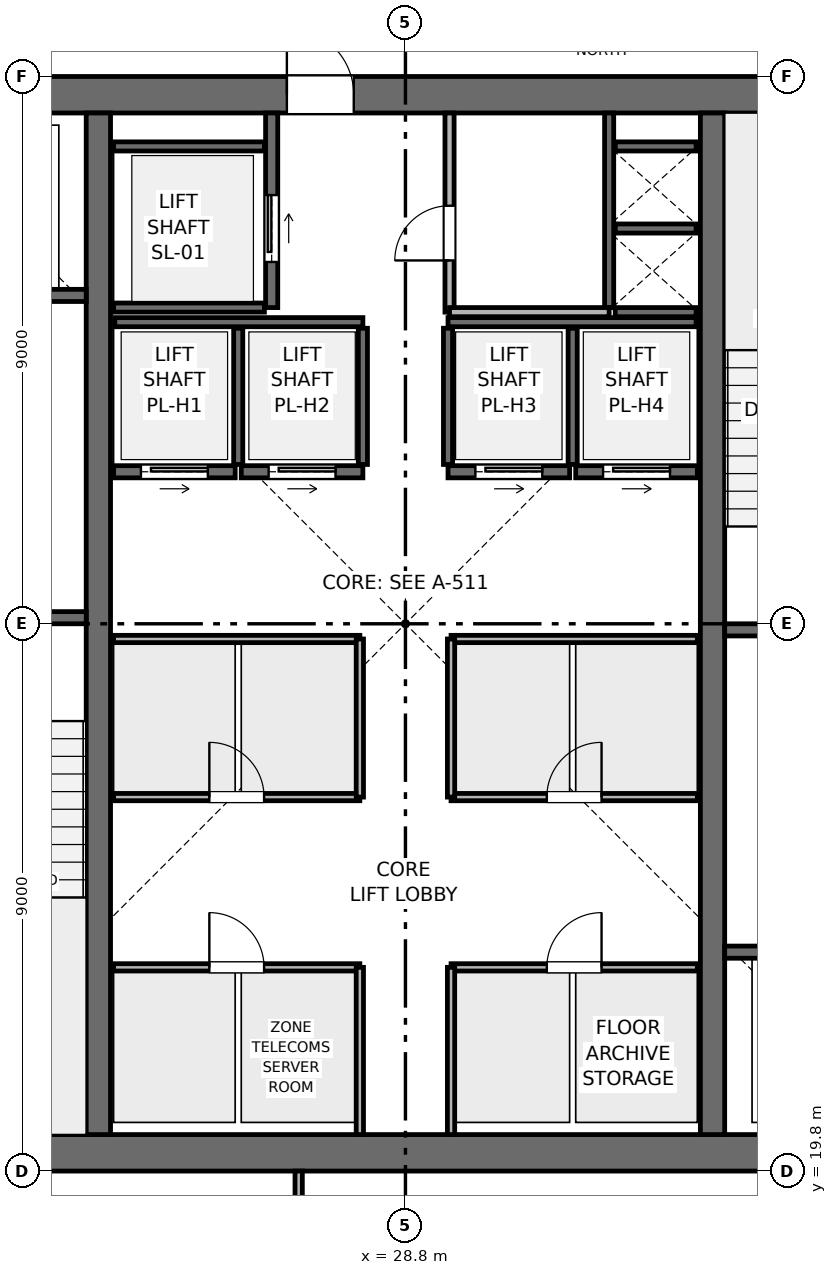
"""IFC4 building model, lengths in metres.
Left out: names, types, materials, properties, quantities, classifications, styles, units other than length and angle.
Written with IfcOpenShell. Run it as: python <this file> out.ifc"""

import sys

from ifc_helpers import new_model, si_unit, direction, frame, frame_2d, origin, place, context, subcontext, project, spatial, rectangle, extrude, element, fill, save


model = new_model("IFC4")
c1 = context("Model", 3, precision=1e-05, world=origin(), true_north=direction((0.0, 1.0)))
c2 = subcontext(c1, "Body", "Model", "MODEL_VIEW")
j1 = project(units=[si_unit("LENGTHUNIT", "METRE"), si_unit("PLANEANGLEUNIT", "RADIAN")], contexts=[c1])
p1 = place(None, origin())
s1 = spatial("IfcSite", under=j1, at=p1, CompositionType="ELEMENT")
p2 = place(p1, origin())
s2 = spatial("IfcBuilding", under=s1, at=p2, CompositionType="ELEMENT")
p3 = place(p2, frame((0.0, 0.0, 333.0)))
s3 = spatial("IfcBuildingStorey", under=s2, at=p3, CompositionType="ELEMENT", Elevation=333.0)
p4 = place(p3, frame((19.8, 20.1, 0.0), z_axis=(0.0, 0.0, 1.0), x_axis=(1.0, 0.0, 0.0)))
e1 = element("IfcWall", 1, at=p4, inside=s3, PredefinedType="SHEAR", context=c2, shape_type="SweptSolid", body=[
    extrude(rectangle(XDim=18.0, YDim=0.6, at=frame_2d((9.0, 0.0))), origin(), (0.0, 0.0, 1.0), 3.75),
])
p5 = place(p3, frame((19.8, 37.5, 0.0), z_axis=(0.0, 0.0, 1.0), x_axis=(1.0, 0.0, 0.0)))
e2 = element("IfcWall", 2, at=p5, inside=s3, PredefinedType="SHEAR", context=c2, shape_type="SweptSolid", body=[
    extrude(rectangle(XDim=18.0, YDim=0.6, at=frame_2d((9.0, 0.0))), origin(), (0.0, 0.0, 1.0), 3.75),
])
p6 = place(p5, frame((7.05, 0.0, 0.0)))
e3 = element("IfcOpeningElement", 3, at=p6, cuts=e2, PredefinedType="OPENING", context=c2, shape_type="SweptSolid", body=[
    extrude(rectangle(XDim=1.1, YDim=2.15, at=frame_2d((0.55, 1.075))), frame((0.0, 0.31, 0.0), z_axis=(0.0, -1.0, 0.0), x_axis=(1.0, 0.0, 0.0)), (0.0, 0.0, 1.0), 0.62),
])
for number, where, z_axis, x_axis in (
    (4, (23.75, 20.4, 0.0), (0.0, 0.0, 1.0), (0.0, 1.0, 0.0)),
    (5, (33.85, 20.4, 0.0), (0.0, 0.0, 1.0), (0.0, 1.0, 0.0)),
):
    element("IfcWall", number, at=place(p3, frame(where, z_axis=z_axis, x_axis=x_axis)), inside=s3, PredefinedType="SHEAR", context=c2, shape_type="SweptSolid", body=[
        extrude(rectangle(XDim=16.8, YDim=0.4, at=frame_2d((8.4, 0.0))), origin(), (0.0, 0.0, 1.0), 3.75),
    ])
p7 = place(p3, frame((20.4, 28.9, 0.0), z_axis=(0.0, 0.0, 1.0), x_axis=(1.0, 0.0, 0.0)))
e6 = element("IfcWall", 6, at=p7, inside=s3, PredefinedType="SHEAR", context=c2, shape_type="SweptSolid", body=[
    extrude(rectangle(XDim=3.15, YDim=0.2, at=frame_2d((1.575, 0.0))), origin(), (0.0, 0.0, 1.0), 3.51),
])
p8 = place(p7, frame((0.8, 0.0, 0.0)))
e7 = element("IfcOpeningElement", 7, at=p8, cuts=e6, PredefinedType="OPENING", context=c2, shape_type="SweptSolid", body=[
    extrude(rectangle(XDim=1.0, YDim=2.1, at=frame_2d((0.5, 1.05))), frame((0.0, 0.11, 0.0), z_axis=(0.0, -1.0, 0.0), x_axis=(1.0, 0.0, 0.0)), (0.0, 0.0, 1.0), 0.22),
])
p9 = place(p3, frame((34.05, 28.7, 0.0), z_axis=(0.0, 0.0, 1.0), x_axis=(1.0, 0.0, 0.0)))
e8 = element("IfcWall", 8, at=p9, inside=s3, PredefinedType="SHEAR", context=c2, shape_type="SweptSolid", body=[
    extrude(rectangle(XDim=3.15, YDim=0.2, at=frame_2d((1.575, 0.0))), origin(), (0.0, 0.0, 1.0), 3.51),
])
p10 = place(p9, frame((0.8, 0.0, 0.0)))
e9 = element("IfcOpeningElement", 9, at=p10, cuts=e8, PredefinedType="OPENING", context=c2, shape_type="SweptSolid", body=[
    extrude(rectangle(XDim=1.0, YDim=2.1, at=frame_2d((0.5, 1.05))), frame((0.0, 0.11, 0.0), z_axis=(0.0, -1.0, 0.0), x_axis=(1.0, 0.0, 0.0)), (0.0, 0.0, 1.0), 0.22),
])
p11 = place(p3, frame((32.15, 34.0, 0.0), z_axis=(0.0, 0.0, 1.0), x_axis=(0.0, 1.0, 0.0)))
e10 = element("IfcWall", 10, at=p11, inside=s3, PredefinedType="SHEAR", context=c2, shape_type="SweptSolid", body=[
    extrude(rectangle(XDim=3.2, YDim=0.15, at=frame_2d((1.6, 0.0))), origin(), (0.0, 0.0, 1.0), 3.51),
])
for number, where, z_axis, x_axis in (
    (11, (32.25, 33.925, 0.0), (0.0, 0.0, 1.0), (1.0, 0.0, 0.0)),
    (12, (32.25, 35.3, 0.0), (0.0, 0.0, 1.0), (1.0, 0.0, 0.0)),
):
    element("IfcWall", number, at=place(p3, frame(where, z_axis=z_axis, x_axis=x_axis)), inside=s3, PredefinedType="SHEAR", context=c2, shape_type="SweptSolid", body=[
        extrude(rectangle(XDim=1.33, YDim=0.15, at=frame_2d((0.665, 0.0))), origin(), (0.0, 0.0, 1.0), 3.51),
    ])
p12 = place(p3, frame((20.5, 34.2, 0.0), z_axis=(0.0, 0.0, 1.0), x_axis=(1.0, 0.0, 0.0)))
e13 = element("IfcWall", 13, at=p12, inside=s3, PredefinedType="SHEAR", context=c2, shape_type="SweptSolid", body=[
    extrude(rectangle(XDim=3.05, YDim=0.2, at=frame_2d((1.525, 0.0))), origin(), (0.0, 0.0, 1.0), 3.51),
])
p13 = place(p12, frame((0.75, 0.0, 0.0)))
e14 = element("IfcOpeningElement", 14, at=p13, cuts=e13, PredefinedType="OPENING", context=c2, shape_type="SweptSolid", body=[
    extrude(rectangle(XDim=1.1, YDim=2.15, at=frame_2d((0.55, 1.075))), frame((0.0, 0.11, 0.0), z_axis=(0.0, -1.0, 0.0), x_axis=(1.0, 0.0, 0.0)), (0.0, 0.0, 1.0), 0.22),
])
p14 = place(p3, frame((34.05, 23.4, 0.0), z_axis=(0.0, 0.0, 1.0), x_axis=(1.0, 0.0, 0.0)))
e15 = element("IfcWall", 15, at=p14, inside=s3, PredefinedType="SHEAR", context=c2, shape_type="SweptSolid", body=[
    extrude(rectangle(XDim=3.05, YDim=0.2, at=frame_2d((1.525, 0.0))), origin(), (0.0, 0.0, 1.0), 3.51),
])
p15 = place(p14, frame((1.2, 0.0, 0.0)))
e16 = element("IfcOpeningElement", 16, at=p15, cuts=e15, PredefinedType="OPENING", context=c2, shape_type="SweptSolid", body=[
    extrude(rectangle(XDim=1.1, YDim=2.15, at=frame_2d((0.55, 1.075))), frame((0.0, 0.11, 0.0), z_axis=(0.0, -1.0, 0.0), x_axis=(1.0, 0.0, 0.0)), (0.0, 0.0, 1.0), 0.22),
])
p16 = place(p3, frame((26.6, 34.0, 0.0), z_axis=(0.0, 0.0, 1.0), x_axis=(0.0, 1.0, 0.0)))
e17 = element("IfcWall", 17, at=p16, inside=s3, PredefinedType="SHEAR", context=c2, shape_type="SweptSolid", body=[
    extrude(rectangle(XDim=3.2, YDim=0.2, at=frame_2d((1.6, 0.0))), origin(), (0.0, 0.0, 1.0), 3.51),
])
p17 = place(p16, frame((0.75, 0.0, 0.0)))
e18 = element("IfcOpeningElement", 18, at=p17, cuts=e17, PredefinedType="OPENING", context=c2, shape_type="SweptSolid", body=[
    extrude(rectangle(XDim=1.1, YDim=2.15, at=frame_2d((0.55, 1.075))), frame((0.0, 0.11, 0.0), z_axis=(0.0, -1.0, 0.0), x_axis=(1.0, 0.0, 0.0)), (0.0, 0.0, 1.0), 0.22),
])
for number, where, z_axis, x_axis in (
    (19, (24.0, 34.0, 0.0), (0.0, 0.0, 1.0), (1.0, 0.0, 0.0)),
    (20, (24.0, 36.65, 0.0), (0.0, 0.0, 1.0), (1.0, 0.0, 0.0)),
):
    element("IfcWall", number, at=place(p3, frame(where, z_axis=z_axis, x_axis=x_axis)), inside=s3, PredefinedType="SHEAR", context=c2, shape_type="SweptSolid", body=[
        extrude(rectangle(XDim=2.48, YDim=0.15, at=frame_2d((1.24, 0.0))), origin(), (0.0, 0.0, 1.0), 3.51),
    ])
p18 = place(p3, frame((24.0, 31.3, 0.0), z_axis=(0.0, 0.0, 1.0), x_axis=(1.0, 0.0, 0.0)))
e21 = element("IfcWall", 21, at=p18, inside=s3, PredefinedType="SHEAR", context=c2, shape_type="SweptSolid", body=[
    extrude(rectangle(XDim=2.0, YDim=0.2, at=frame_2d((1.0, 0.0))), origin(), (0.0, 0.0, 1.0), 3.51),
])
p19 = place(p18, frame((0.45, 0.0, 0.0)))
e22 = element("IfcOpeningElement", 22, at=p19, cuts=e21, PredefinedType="OPENING", context=c2, shape_type="SweptSolid", body=[
    extrude(rectangle(XDim=1.1, YDim=2.15, at=frame_2d((0.55, 1.075))), frame((0.0, 0.11, 0.0), z_axis=(0.0, -1.0, 0.0), x_axis=(1.0, 0.0, 0.0)), (0.0, 0.0, 1.0), 0.22),
])
p20 = place(p3, frame((26.1, 31.3, 0.0), z_axis=(0.0, 0.0, 1.0), x_axis=(1.0, 0.0, 0.0)))
e23 = element("IfcWall", 23, at=p20, inside=s3, PredefinedType="SHEAR", context=c2, shape_type="SweptSolid", body=[
    extrude(rectangle(XDim=2.0, YDim=0.2, at=frame_2d((1.0, 0.0))), origin(), (0.0, 0.0, 1.0), 3.51),
])
p21 = place(p20, frame((0.45, 0.0, 0.0)))
e24 = element("IfcOpeningElement", 24, at=p21, cuts=e23, PredefinedType="OPENING", context=c2, shape_type="SweptSolid", body=[
    extrude(rectangle(XDim=1.1, YDim=2.15, at=frame_2d((0.55, 1.075))), frame((0.0, 0.11, 0.0), z_axis=(0.0, -1.0, 0.0), x_axis=(1.0, 0.0, 0.0)), (0.0, 0.0, 1.0), 0.22),
])
p22 = place(p3, frame((29.5, 31.3, 0.0), z_axis=(0.0, 0.0, 1.0), x_axis=(1.0, 0.0, 0.0)))
e25 = element("IfcWall", 25, at=p22, inside=s3, PredefinedType="SHEAR", context=c2, shape_type="SweptSolid", body=[
    extrude(rectangle(XDim=2.0, YDim=0.2, at=frame_2d((1.0, 0.0))), origin(), (0.0, 0.0, 1.0), 3.51),
])
p23 = place(p22, frame((0.45, 0.0, 0.0)))
e26 = element("IfcOpeningElement", 26, at=p23, cuts=e25, PredefinedType="OPENING", context=c2, shape_type="SweptSolid", body=[
    extrude(rectangle(XDim=1.1, YDim=2.15, at=frame_2d((0.55, 1.075))), frame((0.0, 0.11, 0.0), z_axis=(0.0, -1.0, 0.0), x_axis=(1.0, 0.0, 0.0)), (0.0, 0.0, 1.0), 0.22),
])
p24 = place(p3, frame((31.6, 31.3, 0.0), z_axis=(0.0, 0.0, 1.0), x_axis=(1.0, 0.0, 0.0)))
e27 = element("IfcWall", 27, at=p24, inside=s3, PredefinedType="SHEAR", context=c2, shape_type="SweptSolid", body=[
    extrude(rectangle(XDim=2.0, YDim=0.2, at=frame_2d((1.0, 0.0))), origin(), (0.0, 0.0, 1.0), 3.51),
])
p25 = place(p24, frame((0.45, 0.0, 0.0)))
e28 = element("IfcOpeningElement", 28, at=p25, cuts=e27, PredefinedType="OPENING", context=c2, shape_type="SweptSolid", body=[
    extrude(rectangle(XDim=1.1, YDim=2.15, at=frame_2d((0.55, 1.075))), frame((0.0, 0.11, 0.0), z_axis=(0.0, -1.0, 0.0), x_axis=(1.0, 0.0, 0.0)), (0.0, 0.0, 1.0), 0.22),
])
p26 = place(p3, frame((32.25, 36.65, 0.0), z_axis=(0.0, 0.0, 1.0), x_axis=(1.0, 0.0, 0.0)))
e29 = element("IfcWall", 29, at=p26, inside=s3, PredefinedType="SHEAR", context=c2, shape_type="SweptSolid", body=[
    extrude(rectangle(XDim=1.33, YDim=0.15, at=frame_2d((0.665, 0.0))), origin(), (0.0, 0.0, 1.0), 3.51),
])
for number, where, z_axis, x_axis in (
    (30, (24.02, 33.76, 0.0), (0.0, 0.0, 1.0), (1.0, 0.0, 0.0)),
    (31, (29.5, 33.76, 0.0), (0.0, 0.0, 1.0), (1.0, 0.0, 0.0)),
):
    element("IfcWall", number, at=place(p3, frame(where, z_axis=z_axis, x_axis=x_axis)), inside=s3, PredefinedType="SHEAR", context=c2, shape_type="SweptSolid", body=[
        extrude(rectangle(XDim=4.08, YDim=0.15, at=frame_2d((2.04, 0.0))), origin(), (0.0, 0.0, 1.0), 3.51),
    ])
for number, where, z_axis, x_axis in (
    (32, (26.05, 31.42, 0.0), (0.0, 0.0, 1.0), (0.0, 1.0, 0.0)),
    (33, (28.1, 31.42, 0.0), (0.0, 0.0, 1.0), (0.0, 1.0, 0.0)),
    (34, (29.5, 31.42, 0.0), (0.0, 0.0, 1.0), (0.0, 1.0, 0.0)),
    (35, (31.55, 31.42, 0.0), (0.0, 0.0, 1.0), (0.0, 1.0, 0.0)),
):
    element("IfcWall", number, at=place(p3, frame(where, z_axis=z_axis, x_axis=x_axis)), inside=s3, PredefinedType="SHEAR", context=c2, shape_type="SweptSolid", body=[
        extrude(rectangle(XDim=2.24, YDim=0.15, at=frame_2d((1.12, 0.0))), origin(), (0.0, 0.0, 1.0), 3.51),
    ])
p27 = place(p3, frame((29.525, 33.925, 0.0), z_axis=(0.0, 0.0, 1.0), x_axis=(0.0, 1.0, 0.0)))
e36 = element("IfcWall", 36, at=p27, inside=s3, PredefinedType="PARTITIONING", context=c2, shape_type="SweptSolid", body=[
    extrude(rectangle(XDim=3.275, YDim=0.15, at=frame_2d((1.637, 0.0))), origin(), (0.0, 0.0, 1.0), 3.51),
])
p28 = place(p27, frame((0.85, 0.0, 0.0)))
e37 = element("IfcOpeningElement", 37, at=p28, cuts=e36, PredefinedType="OPENING", context=c2, shape_type="SweptSolid", body=[
    extrude(rectangle(XDim=0.9, YDim=2.1, at=frame_2d((0.45, 1.05))), frame((0.0, 0.085, 0.0), z_axis=(0.0, -1.0, 0.0), x_axis=(1.0, 0.0, 0.0)), (0.0, 0.0, 1.0), 0.17),
])
p29 = place(p3, frame((29.525, 33.925, 0.0), z_axis=(0.0, 0.0, 1.0), x_axis=(1.0, 0.0, 0.0)))
e38 = element("IfcWall", 38, at=p29, inside=s3, PredefinedType="PARTITIONING", context=c2, shape_type="SweptSolid", body=[
    extrude(rectangle(XDim=2.625, YDim=0.15, at=frame_2d((1.312, 0.0))), origin(), (0.0, 0.0, 1.0), 3.51),
])
p30 = place(p3, frame((24.0, 23.15, 0.0), z_axis=(0.0, 0.0, 1.0), x_axis=(1.0, 0.0, 0.0)))
e39 = element("IfcWall", 39, at=p30, inside=s3, PredefinedType="PARTITIONING", context=c2, shape_type="SweptSolid", body=[
    extrude(rectangle(XDim=4.05, YDim=0.12, at=frame_2d((2.025, 0.0))), origin(), (0.0, 0.0, 1.0), 3.51),
])
p31 = place(p30, frame((1.575, 0.0, 0.0)))
e40 = element("IfcOpeningElement", 40, at=p31, cuts=e39, PredefinedType="OPENING", context=c2, shape_type="SweptSolid", body=[
    extrude(rectangle(XDim=0.9, YDim=2.1, at=frame_2d((0.45, 1.05))), frame((0.0, 0.07, 0.0), z_axis=(0.0, -1.0, 0.0), x_axis=(1.0, 0.0, 0.0)), (0.0, 0.0, 1.0), 0.14),
])
p32 = place(p3, frame((28.05, 20.4, 0.0), z_axis=(0.0, 0.0, 1.0), x_axis=(0.0, 1.0, 0.0)))
e41 = element("IfcWall", 41, at=p32, inside=s3, PredefinedType="PARTITIONING", context=c2, shape_type="SweptSolid", body=[
    extrude(rectangle(XDim=2.75, YDim=0.12, at=frame_2d((1.375, 0.0))), origin(), (0.0, 0.0, 1.0), 3.51),
])
p33 = place(p3, frame((29.55, 23.15, 0.0), z_axis=(0.0, 0.0, 1.0), x_axis=(1.0, 0.0, 0.0)))
e42 = element("IfcWall", 42, at=p33, inside=s3, PredefinedType="PARTITIONING", context=c2, shape_type="SweptSolid", body=[
    extrude(rectangle(XDim=4.05, YDim=0.12, at=frame_2d((2.025, 0.0))), origin(), (0.0, 0.0, 1.0), 3.51),
])
p34 = place(p33, frame((1.575, 0.0, 0.0)))
e43 = element("IfcOpeningElement", 43, at=p34, cuts=e42, PredefinedType="OPENING", context=c2, shape_type="SweptSolid", body=[
    extrude(rectangle(XDim=0.9, YDim=2.1, at=frame_2d((0.45, 1.05))), frame((0.0, 0.07, 0.0), z_axis=(0.0, -1.0, 0.0), x_axis=(1.0, 0.0, 0.0)), (0.0, 0.0, 1.0), 0.14),
])
p35 = place(p3, frame((29.55, 20.4, 0.0), z_axis=(0.0, 0.0, 1.0), x_axis=(0.0, 1.0, 0.0)))
e44 = element("IfcWall", 44, at=p35, inside=s3, PredefinedType="PARTITIONING", context=c2, shape_type="SweptSolid", body=[
    extrude(rectangle(XDim=2.75, YDim=0.12, at=frame_2d((1.375, 0.0))), origin(), (0.0, 0.0, 1.0), 3.51),
])
p36 = place(p3, frame((24.0, 25.95, 0.0), z_axis=(0.0, 0.0, 1.0), x_axis=(1.0, 0.0, 0.0)))
e45 = element("IfcWall", 45, at=p36, inside=s3, PredefinedType="PARTITIONING", context=c2, shape_type="SweptSolid", body=[
    extrude(rectangle(XDim=4.05, YDim=0.12, at=frame_2d((2.025, 0.0))), origin(), (0.0, 0.0, 1.0), 3.51),
])
p37 = place(p36, frame((1.575, 0.0, 0.0)))
e46 = element("IfcOpeningElement", 46, at=p37, cuts=e45, PredefinedType="OPENING", context=c2, shape_type="SweptSolid", body=[
    extrude(rectangle(XDim=0.9, YDim=2.1, at=frame_2d((0.45, 1.05))), frame((0.0, 0.07, 0.0), z_axis=(0.0, -1.0, 0.0), x_axis=(1.0, 0.0, 0.0)), (0.0, 0.0, 1.0), 0.14),
])
p38 = place(p3, frame((24.0, 28.55, 0.0), z_axis=(0.0, 0.0, 1.0), x_axis=(1.0, 0.0, 0.0)))
e47 = element("IfcWall", 47, at=p38, inside=s3, PredefinedType="PARTITIONING", context=c2, shape_type="SweptSolid", body=[
    extrude(rectangle(XDim=4.05, YDim=0.12, at=frame_2d((2.025, 0.0))), origin(), (0.0, 0.0, 1.0), 3.51),
])
p39 = place(p3, frame((28.05, 25.95, 0.0), z_axis=(0.0, 0.0, 1.0), x_axis=(0.0, 1.0, 0.0)))
e48 = element("IfcWall", 48, at=p39, inside=s3, PredefinedType="PARTITIONING", context=c2, shape_type="SweptSolid", body=[
    extrude(rectangle(XDim=2.6, YDim=0.12, at=frame_2d((1.3, 0.0))), origin(), (0.0, 0.0, 1.0), 3.51),
])
p40 = place(p3, frame((29.55, 25.95, 0.0), z_axis=(0.0, 0.0, 1.0), x_axis=(1.0, 0.0, 0.0)))
e49 = element("IfcWall", 49, at=p40, inside=s3, PredefinedType="PARTITIONING", context=c2, shape_type="SweptSolid", body=[
    extrude(rectangle(XDim=4.05, YDim=0.12, at=frame_2d((2.025, 0.0))), origin(), (0.0, 0.0, 1.0), 3.51),
])
p41 = place(p40, frame((1.575, 0.0, 0.0)))
e50 = element("IfcOpeningElement", 50, at=p41, cuts=e49, PredefinedType="OPENING", context=c2, shape_type="SweptSolid", body=[
    extrude(rectangle(XDim=0.9, YDim=2.1, at=frame_2d((0.45, 1.05))), frame((0.0, 0.07, 0.0), z_axis=(0.0, -1.0, 0.0), x_axis=(1.0, 0.0, 0.0)), (0.0, 0.0, 1.0), 0.14),
])
p42 = place(p3, frame((29.55, 28.55, 0.0), z_axis=(0.0, 0.0, 1.0), x_axis=(1.0, 0.0, 0.0)))
e51 = element("IfcWall", 51, at=p42, inside=s3, PredefinedType="PARTITIONING", context=c2, shape_type="SweptSolid", body=[
    extrude(rectangle(XDim=4.05, YDim=0.12, at=frame_2d((2.025, 0.0))), origin(), (0.0, 0.0, 1.0), 3.51),
])
p43 = place(p3, frame((29.55, 25.95, 0.0), z_axis=(0.0, 0.0, 1.0), x_axis=(0.0, 1.0, 0.0)))
e52 = element("IfcWall", 52, at=p43, inside=s3, PredefinedType="PARTITIONING", context=c2, shape_type="SweptSolid", body=[
    extrude(rectangle(XDim=2.6, YDim=0.12, at=frame_2d((1.3, 0.0))), origin(), (0.0, 0.0, 1.0), 3.51),
])
p44 = place(p3, frame((27.044, 6.73, 0.0), z_axis=(0.0, 0.0, 1.0), x_axis=(0.0, 1.0, 0.0)))
e53 = element("IfcWall", 53, at=p44, inside=s3, PredefinedType="PARTITIONING", context=c2, shape_type="SweptSolid", body=[
    extrude(rectangle(XDim=13.07, YDim=0.12, at=frame_2d((6.535, 0.0))), origin(), (0.0, 0.0, 1.0), 3.135),
])
p45 = place(p44, frame((10.67, 0.0, 0.0)))
e54 = element("IfcOpeningElement", 54, at=p45, cuts=e53, PredefinedType="OPENING", context=c2, shape_type="SweptSolid", body=[
    extrude(rectangle(XDim=0.9, YDim=2.1, at=frame_2d((0.45, 1.05))), frame((0.0, 0.07, 0.0), z_axis=(0.0, -1.0, 0.0), x_axis=(1.0, 0.0, 0.0)), (0.0, 0.0, 1.0), 0.14),
])
p46 = place(p17, origin())
e55 = element("IfcDoor", 55, at=p46, inside=s3, OperationType="SLIDING_TO_RIGHT", PredefinedType="DOOR", context=c2, shape_type="SweptSolid", body=[
    extrude(rectangle(XDim=1.1, YDim=2.15, at=frame_2d((0.55, 1.075))), frame((0.0, 0.025, 0.0), z_axis=(0.0, -1.0, 0.0), x_axis=(1.0, 0.0, 0.0)), (0.0, 0.0, 1.0), 0.05),
])
fill(e18, e55)
p47 = place(p19, origin())
e56 = element("IfcDoor", 56, at=p47, inside=s3, OperationType="SLIDING_TO_RIGHT", PredefinedType="DOOR", context=c2, shape_type="SweptSolid", body=[
    extrude(rectangle(XDim=1.1, YDim=2.15, at=frame_2d((0.55, 1.075))), frame((0.0, 0.025, 0.0), z_axis=(0.0, -1.0, 0.0), x_axis=(1.0, 0.0, 0.0)), (0.0, 0.0, 1.0), 0.05),
])
fill(e22, e56)
p48 = place(p21, origin())
e57 = element("IfcDoor", 57, at=p48, inside=s3, OperationType="SLIDING_TO_RIGHT", PredefinedType="DOOR", context=c2, shape_type="SweptSolid", body=[
    extrude(rectangle(XDim=1.1, YDim=2.15, at=frame_2d((0.55, 1.075))), frame((0.0, 0.025, 0.0), z_axis=(0.0, -1.0, 0.0), x_axis=(1.0, 0.0, 0.0)), (0.0, 0.0, 1.0), 0.05),
])
fill(e24, e57)
p49 = place(p23, origin())
e58 = element("IfcDoor", 58, at=p49, inside=s3, OperationType="SLIDING_TO_RIGHT", PredefinedType="DOOR", context=c2, shape_type="SweptSolid", body=[
    extrude(rectangle(XDim=1.1, YDim=2.15, at=frame_2d((0.55, 1.075))), frame((0.0, 0.025, 0.0), z_axis=(0.0, -1.0, 0.0), x_axis=(1.0, 0.0, 0.0)), (0.0, 0.0, 1.0), 0.05),
])
fill(e26, e58)
p50 = place(p25, origin())
e59 = element("IfcDoor", 59, at=p50, inside=s3, OperationType="SLIDING_TO_RIGHT", PredefinedType="DOOR", context=c2, shape_type="SweptSolid", body=[
    extrude(rectangle(XDim=1.1, YDim=2.15, at=frame_2d((0.55, 1.075))), frame((0.0, 0.025, 0.0), z_axis=(0.0, -1.0, 0.0), x_axis=(1.0, 0.0, 0.0)), (0.0, 0.0, 1.0), 0.05),
])
fill(e28, e59)
p51 = place(p28, origin())
e60 = element("IfcDoor", 60, at=p51, inside=s3, OperationType="SINGLE_SWING_LEFT", PredefinedType="DOOR", context=c2, shape_type="SweptSolid", body=[
    extrude(rectangle(XDim=0.9, YDim=2.1, at=frame_2d((0.45, 1.05))), frame((0.0, 0.025, 0.0), z_axis=(0.0, -1.0, 0.0), x_axis=(1.0, 0.0, 0.0)), (0.0, 0.0, 1.0), 0.05),
])
fill(e37, e60)
p52 = place(p31, origin())
e61 = element("IfcDoor", 61, at=p52, inside=s3, OperationType="SINGLE_SWING_LEFT", PredefinedType="DOOR", context=c2, shape_type="SweptSolid", body=[
    extrude(rectangle(XDim=0.9, YDim=2.1, at=frame_2d((0.45, 1.05))), frame((0.0, 0.025, 0.0), z_axis=(0.0, -1.0, 0.0), x_axis=(1.0, 0.0, 0.0)), (0.0, 0.0, 1.0), 0.05),
])
fill(e40, e61)
p53 = place(p34, origin())
e62 = element("IfcDoor", 62, at=p53, inside=s3, OperationType="SINGLE_SWING_RIGHT", PredefinedType="DOOR", context=c2, shape_type="SweptSolid", body=[
    extrude(rectangle(XDim=0.9, YDim=2.1, at=frame_2d((0.45, 1.05))), frame((0.0, 0.025, 0.0), z_axis=(0.0, -1.0, 0.0), x_axis=(1.0, 0.0, 0.0)), (0.0, 0.0, 1.0), 0.05),
])
fill(e43, e62)
p54 = place(p37, origin())
e63 = element("IfcDoor", 63, at=p54, inside=s3, OperationType="SINGLE_SWING_LEFT", PredefinedType="DOOR", context=c2, shape_type="SweptSolid", body=[
    extrude(rectangle(XDim=0.9, YDim=2.1, at=frame_2d((0.45, 1.05))), frame((0.0, 0.025, 0.0), z_axis=(0.0, -1.0, 0.0), x_axis=(1.0, 0.0, 0.0)), (0.0, 0.0, 1.0), 0.05),
])
fill(e46, e63)
p55 = place(p41, origin())
e64 = element("IfcDoor", 64, at=p55, inside=s3, OperationType="SINGLE_SWING_RIGHT", PredefinedType="DOOR", context=c2, shape_type="SweptSolid", body=[
    extrude(rectangle(XDim=0.9, YDim=2.1, at=frame_2d((0.45, 1.05))), frame((0.0, 0.025, 0.0), z_axis=(0.0, -1.0, 0.0), x_axis=(1.0, 0.0, 0.0)), (0.0, 0.0, 1.0), 0.05),
])
fill(e50, e64)
p56 = place(p6, origin())
e65 = element("IfcDoor", 65, at=p56, inside=s3, OperationType="SINGLE_SWING_LEFT", PredefinedType="DOOR", context=c2, shape_type="SweptSolid", body=[
    extrude(rectangle(XDim=1.1, YDim=2.15, at=frame_2d((0.55, 1.075))), frame((0.0, 0.025, 0.0), z_axis=(0.0, -1.0, 0.0), x_axis=(1.0, 0.0, 0.0)), (0.0, 0.0, 1.0), 0.05),
])
fill(e3, e65)
save(model, sys.argv[1])
